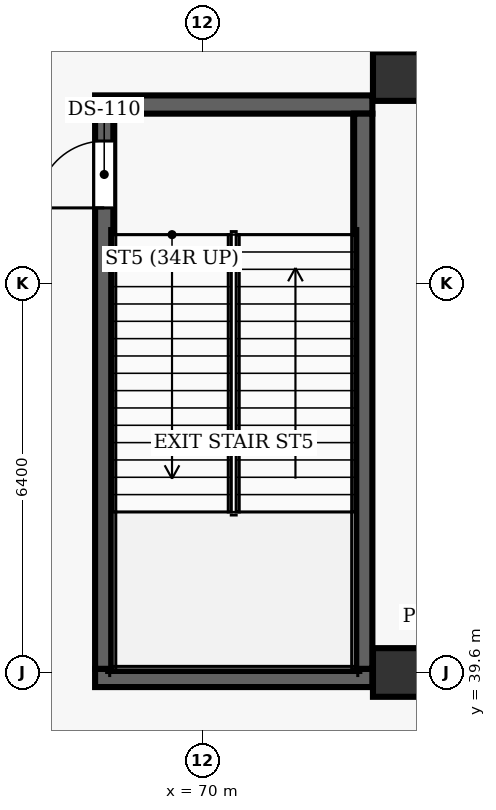
"""IFC4 building model, lengths in metres.
Left out: names, types, materials, properties, quantities, classifications, styles, units other than length and angle.
Written with IfcOpenShell. Run it as: python <this file> out.ifc"""

import sys

from ifc_helpers import new_model, si_unit, direction, frame, frame_2d, origin, origin_2d, place, context, subcontext, project, spatial, rectangle, extrude, element, fill, save


model = new_model("IFC4")
c1 = context("Model", 3, precision=1e-05, world=origin(), true_north=direction((0.0, 1.0)))
c2 = subcontext(c1, "Body", "Model", "MODEL_VIEW")
j1 = project(units=[si_unit("LENGTHUNIT", "METRE"), si_unit("PLANEANGLEUNIT", "RADIAN")], contexts=[c1])
p1 = place(None, origin())
s1 = spatial("IfcSite", under=j1, at=p1, CompositionType="ELEMENT")
p2 = place(p1, origin())
s2 = spatial("IfcBuilding", under=s1, at=p2, CompositionType="ELEMENT")
p3 = place(p2, frame((0.0, 0.0, 24.0)))
s3 = spatial("IfcBuildingStorey", under=s2, at=p3, CompositionType="ELEMENT", Elevation=24.0)
for number, where, z_axis, x_axis in (
    (1, (73.2, 39.6, 0.0), (0.0, 0.0, 1.0), (1.0, 0.0, 0.0)),
    (2, (73.2, 49.4, 0.0), (0.0, 0.0, 1.0), (1.0, 0.0, 0.0)),
):
    element("IfcColumn", number, at=place(p3, frame(where, z_axis=z_axis, x_axis=x_axis)), inside=s3, PredefinedType="COLUMN", context=c2, shape_type="SweptSolid", body=[
        extrude(rectangle(XDim=0.8, YDim=0.8, at=origin_2d()), origin(), (0.0, 0.0, 1.0), 6.0),
    ])
for number, where, z_axis, x_axis in (
    (3, (68.23, 39.51, 0.0), (0.0, 0.0, 1.0), (1.0, 0.0, 0.0)),
    (4, (68.23, 48.94, 0.0), (0.0, 0.0, 1.0), (1.0, 0.0, 0.0)),
):
    element("IfcWall", number, at=place(p3, frame(where, z_axis=z_axis, x_axis=x_axis)), inside=s3, PredefinedType="SHEAR", context=c2, shape_type="SweptSolid", body=[
        extrude(rectangle(XDim=4.56, YDim=0.3, at=frame_2d((2.28, 0.0))), origin(), (0.0, 0.0, 1.0), 6.0),
    ])
p4 = place(p3, frame((68.38, 39.66, 0.0), z_axis=(0.0, 0.0, 1.0), x_axis=(0.0, 1.0, 0.0)))
e5 = element("IfcWall", 5, at=p4, inside=s3, PredefinedType="SHEAR", context=c2, shape_type="SweptSolid", body=[
    extrude(rectangle(XDim=9.13, YDim=0.3, at=frame_2d((4.565, 0.0))), origin(), (0.0, 0.0, 1.0), 6.0),
])
p5 = place(p4, frame((7.58, 0.0, 0.0)))
e6 = element("IfcOpeningElement", 6, at=p5, cuts=e5, PredefinedType="OPENING", context=c2, shape_type="SweptSolid", body=[
    extrude(rectangle(XDim=1.1, YDim=2.15, at=frame_2d((0.55, 1.075))), frame((0.0, 0.16, 0.0), z_axis=(0.0, -1.0, 0.0), x_axis=(1.0, 0.0, 0.0)), (0.0, 0.0, 1.0), 0.32),
])
p6 = place(p3, frame((72.64, 48.79, 0.0), z_axis=(0.0, 0.0, 1.0), x_axis=(0.0, -1.0, 0.0)))
e7 = element("IfcWall", 7, at=p6, inside=s3, PredefinedType="SHEAR", context=c2, shape_type="SweptSolid", body=[
    extrude(rectangle(XDim=9.13, YDim=0.3, at=frame_2d((4.565, 0.0))), origin(), (0.0, 0.0, 1.0), 6.0),
])
p7 = place(p5, origin())
e8 = element("IfcDoor", 8, at=p7, inside=s3, OperationType="SINGLE_SWING_LEFT", PredefinedType="DOOR", context=c2, shape_type="SweptSolid", body=[
    extrude(rectangle(XDim=1.1, YDim=2.15, at=frame_2d((0.55, 1.075))), frame((0.0, 0.025, 0.0), z_axis=(0.0, -1.0, 0.0), x_axis=(1.0, 0.0, 0.0)), (0.0, 0.0, 1.0), 0.05),
])
fill(e6, e8)
save(model, sys.argv[1])
